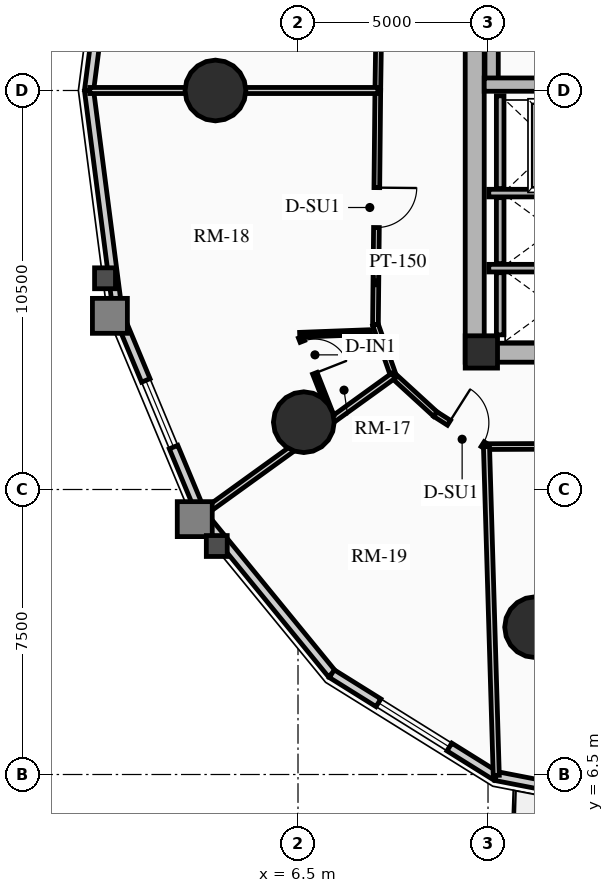
"""IFC4 building model, lengths in metres.
Left out: names, types, materials, properties, quantities, classifications, styles, units other than length and angle.
Written with IfcOpenShell. Run it as: python <this file> out.ifc"""

import sys

from ifc_helpers import new_model, si_unit, direction, frame, frame_2d, origin, origin_2d, place, context, subcontext, project, spatial, rectangle, circle, extrude, source, transform, mapped, element, fill, save


model = new_model("IFC4")
c1 = context("Model", 3, precision=1e-05, world=origin(), true_north=direction((0.0, 1.0)))
c2 = subcontext(c1, "Body", "Model", "MODEL_VIEW")
j1 = project(units=[si_unit("LENGTHUNIT", "METRE"), si_unit("PLANEANGLEUNIT", "RADIAN")], contexts=[c1])
p1 = place(None, origin())
s1 = spatial("IfcSite", under=j1, at=p1, CompositionType="ELEMENT")
p2 = place(p1, origin())
s2 = spatial("IfcBuilding", under=s1, at=p2, CompositionType="ELEMENT")
p3 = place(p2, frame((0.0, 0.0, 30.73)))
s3 = spatial("IfcBuildingStorey", under=s2, at=p3, CompositionType="ELEMENT", Elevation=30.73)
p4 = place(p3, frame((11.15, 17.35, 0.0), z_axis=(0.0, 0.0, 1.0), x_axis=(0.0, 1.0, 0.0)))
e1 = element("IfcWall", 1, at=p4, inside=s3, PredefinedType="SHEAR", context=c2, shape_type="SweptSolid", body=[
    extrude(rectangle(XDim=14.3, YDim=0.5, at=frame_2d((7.15, 0.0))), origin(), (0.0, 0.0, 1.0), 2.91),
])
p5 = place(p3, frame((11.15, 17.6, 0.0), z_axis=(0.0, 0.0, 1.0), x_axis=(1.0, 0.0, 0.0)))
e2 = element("IfcWall", 2, at=p5, inside=s3, PredefinedType="SHEAR", context=c2, shape_type="SweptSolid", body=[
    extrude(rectangle(XDim=10.7, YDim=0.5, at=frame_2d((5.35, 0.0))), origin(), (0.0, 0.0, 1.0), 2.91),
])
m1 = source(origin(), c2, "Body", "SweptSolid", [
    extrude(rectangle(XDim=1.5, YDim=2.02, at=frame_2d((0.75, 1.01))), frame((0.0, 0.26, 0.0), z_axis=(0.0, -1.0, 0.0), x_axis=(1.0, 0.0, 0.0)), (0.0, 0.0, 1.0), 0.52),
])
p6 = place(p5, frame((5.45, 0.0, 0.0)))
e3 = element("IfcOpeningElement", 3, at=p6, cuts=e2, PredefinedType="OPENING", context=c2, shape_type="MappedRepresentation", body=[
    mapped(m1, transform((0.0, 0.0, 0.0), x_axis=(1.0, 0.0, 0.0), y_axis=(0.0, 1.0, 0.0), z_axis=(0.0, 0.0, 1.0), scale=1.0)),
])
p7 = place(p3, frame((11.595, 24.655, 0.0), z_axis=(0.0, 0.0, 1.0), x_axis=(0.0, 1.0, 0.0)))
e4 = element("IfcWall", 4, at=p7, inside=s3, PredefinedType="SHEAR", context=c2, shape_type="SweptSolid", body=[
    extrude(rectangle(XDim=6.745, YDim=0.35, at=frame_2d((3.373, 0.0))), origin(), (0.0, 0.0, 1.0), 2.91),
])
p8 = place(p3, frame((11.4, 24.655, 0.0), z_axis=(0.0, 0.0, 1.0), x_axis=(1.0, 0.0, 0.0)))
e5 = element("IfcWall", 5, at=p8, inside=s3, PredefinedType="SHEAR", context=c2, shape_type="SweptSolid", body=[
    extrude(rectangle(XDim=3.285, YDim=0.35, at=frame_2d((1.643, 0.0))), origin(), (0.0, 0.0, 1.0), 2.91),
])
p9 = place(p3, frame((11.325, 17.62, 0.0), z_axis=(0.0, 0.0, 1.0), x_axis=(1.0, 0.0, 0.0)))
e6 = element("IfcColumn", 6, at=p9, inside=s3, PredefinedType="COLUMN", context=c2, shape_type="SweptSolid", body=[
    extrude(rectangle(XDim=0.85, YDim=0.85, at=origin_2d()), origin(), (0.0, 0.0, 1.0), 2.91),
])
for number, where, z_axis, x_axis in (
    (7, (4.328, 24.5, 0.0), (0.0, 0.0, 1.0), (1.0, 0.0, 0.0)),
    (8, (6.653, 15.771, 0.0), (0.0, 0.0, 1.0), (1.0, 0.0, 0.0)),
    (9, (12.739, 10.377, 0.0), (0.0, 0.0, 1.0), (1.0, 0.0, 0.0)),
):
    element("IfcColumn", number, at=place(p3, frame(where, z_axis=z_axis, x_axis=x_axis)), inside=s3, PredefinedType="USERDEFINED", context=c2, shape_type="SweptSolid", body=[
        extrude(circle(Radius=0.8, at=origin_2d()), origin(), (0.0, 0.0, 1.0), 2.91),
    ])
p10 = place(p3, frame((1.001, 24.5, 0.0), z_axis=(0.0, 0.0, 1.0), x_axis=(0.128329107357, 0.991731637191, 0.0)))
e10 = element("IfcWall", 10, at=p10, inside=s3, PredefinedType="SOLIDWALL", context=c2, shape_type="SweptSolid", body=[
    extrude(rectangle(XDim=5.911, YDim=0.24, at=frame_2d((2.956, 0.0))), origin(), (0.0, 0.0, 1.0), 2.073),
])
m2 = source(origin(), c2, "Body", "SweptSolid", [
    extrude(rectangle(XDim=1.9, YDim=1.35, at=frame_2d((0.95, 0.675))), frame((0.0, 0.13, 0.0), z_axis=(0.0, -1.0, 0.0), x_axis=(1.0, 0.0, 0.0)), (0.0, 0.0, 1.0), 0.26),
])
p11 = place(p10, frame((2.005, 0.0, 0.65)))
e11 = element("IfcOpeningElement", 11, at=p11, cuts=e10, PredefinedType="OPENING", context=c2, shape_type="MappedRepresentation", body=[
    mapped(m2, transform((0.0, 0.0, 0.0), x_axis=(1.0, 0.0, 0.0), y_axis=(0.0, 1.0, 0.0), z_axis=(0.0, 0.0, 1.0), scale=1.0)),
])
p12 = place(p3, frame((1.76, 18.638, 0.0), z_axis=(0.0, 0.0, 1.0), x_axis=(-0.128329107357, 0.991731637191, 0.0)))
e12 = element("IfcWall", 12, at=p12, inside=s3, PredefinedType="SOLIDWALL", context=c2, shape_type="SweptSolid", body=[
    extrude(rectangle(XDim=5.911, YDim=0.24, at=frame_2d((2.956, 0.0))), origin(), (0.0, 0.0, 1.0), 2.073),
])
p13 = place(p3, frame((3.961, 13.35, 0.0), z_axis=(0.0, 0.0, 1.0), x_axis=(-0.38430970593, 0.923204229804, 0.0)))
e13 = element("IfcWall", 13, at=p13, inside=s3, PredefinedType="SOLIDWALL", context=c2, shape_type="SweptSolid", body=[
    extrude(rectangle(XDim=5.728, YDim=0.24, at=frame_2d((2.864, 0.0))), origin(), (0.0, 0.0, 1.0), 2.073),
])
p14 = place(p13, frame((1.914, 0.0, 0.65)))
e14 = element("IfcOpeningElement", 14, at=p14, cuts=e13, PredefinedType="OPENING", context=c2, shape_type="MappedRepresentation", body=[
    mapped(m2, transform((0.0, 0.0, 0.0), x_axis=(1.0, 0.0, 0.0), y_axis=(0.0, 1.0, 0.0), z_axis=(0.0, 0.0, 1.0), scale=1.0)),
])
p15 = place(p3, frame((7.39, 9.153, 0.0), z_axis=(0.0, 0.0, 1.0), x_axis=(-0.632710215588, 0.774388651189, 0.0)))
e15 = element("IfcWall", 15, at=p15, inside=s3, PredefinedType="SOLIDWALL", context=c2, shape_type="SweptSolid", body=[
    extrude(rectangle(XDim=5.419, YDim=0.24, at=frame_2d((2.71, 0.0))), origin(), (0.0, 0.0, 1.0), 2.073),
])
p16 = place(p3, frame((11.71, 6.458, 0.0), z_axis=(0.0, 0.0, 1.0), x_axis=(-0.848528534887, 0.529149624853, 0.0)))
e16 = element("IfcWall", 16, at=p16, inside=s3, PredefinedType="SOLIDWALL", context=c2, shape_type="SweptSolid", body=[
    extrude(rectangle(XDim=5.092, YDim=0.24, at=frame_2d((2.546, 0.0))), origin(), (0.0, 0.0, 1.0), 2.073),
])
m3 = source(origin(), c2, "Body", "SweptSolid", [
    extrude(rectangle(XDim=2.2, YDim=1.35, at=frame_2d((1.1, 0.675))), frame((0.0, 0.13, 0.0), z_axis=(0.0, -1.0, 0.0), x_axis=(1.0, 0.0, 0.0)), (0.0, 0.0, 1.0), 0.26),
])
p17 = place(p16, frame((1.446, 0.0, 0.65)))
e17 = element("IfcOpeningElement", 17, at=p17, cuts=e16, PredefinedType="OPENING", context=c2, shape_type="MappedRepresentation", body=[
    mapped(m3, transform((0.0, 0.0, 0.0), x_axis=(1.0, 0.0, 0.0), y_axis=(0.0, 1.0, 0.0), z_axis=(0.0, 0.0, 1.0), scale=1.0)),
])
p18 = place(p3, frame((16.5, 5.53, 0.0), z_axis=(0.0, 0.0, 1.0), x_axis=(-0.981724094622, 0.190309752872, 0.0)))
e18 = element("IfcWall", 18, at=p18, inside=s3, PredefinedType="SOLIDWALL", context=c2, shape_type="SweptSolid", body=[
    extrude(rectangle(XDim=4.879, YDim=0.24, at=frame_2d((2.439, 0.0))), origin(), (0.0, 0.0, 1.0), 2.073),
])
m4 = source(origin(), c2, "Body", "SweptSolid", [
    extrude(rectangle(XDim=1.15, YDim=2.005, at=frame_2d((0.575, 1.002))), frame((0.0, 0.13, 0.0), z_axis=(0.0, -1.0, 0.0), x_axis=(1.0, 0.0, 0.0)), (0.0, 0.0, 1.0), 0.26),
])
p19 = place(p18, frame((1.864, 0.0, 0.0)))
e19 = element("IfcOpeningElement", 19, at=p19, cuts=e18, PredefinedType="OPENING", context=c2, shape_type="MappedRepresentation", body=[
    mapped(m4, transform((0.0, 0.0, 0.0), x_axis=(1.0, 0.0, 0.0), y_axis=(0.0, 1.0, 0.0), z_axis=(0.0, 0.0, 1.0), scale=1.0)),
])
p20 = place(p3, frame((11.52, 21.8, 0.0), z_axis=(0.0, 0.0, 1.0), x_axis=(1.0, 0.0, 0.0)))
e20 = element("IfcWall", 20, at=p20, inside=s3, PredefinedType="SHEAR", context=c2, shape_type="SweptSolid", body=[
    extrude(rectangle(XDim=2.97, YDim=0.2, at=frame_2d((1.485, 0.0))), origin(), (0.0, 0.0, 1.0), 2.91),
])
p21 = place(p3, frame((11.82, 21.92, 0.0), z_axis=(0.0, 0.0, 1.0), x_axis=(0.0, 1.0, 0.0)))
e21 = element("IfcWall", 21, at=p21, inside=s3, PredefinedType="SHEAR", context=c2, shape_type="SweptSolid", body=[
    extrude(rectangle(XDim=2.44, YDim=0.2, at=frame_2d((1.22, 0.0))), origin(), (0.0, 0.0, 1.0), 2.91),
])
p22 = place(p3, frame((11.52, 19.825, 0.0), z_axis=(0.0, 0.0, 1.0), x_axis=(1.0, 0.0, 0.0)))
e22 = element("IfcWall", 22, at=p22, inside=s3, PredefinedType="SHEAR", context=c2, shape_type="SweptSolid", body=[
    extrude(rectangle(XDim=2.97, YDim=0.2, at=frame_2d((1.485, 0.0))), origin(), (0.0, 0.0, 1.0), 2.91),
])
p23 = place(p3, frame((11.82, 19.945, 0.0), z_axis=(0.0, 0.0, 1.0), x_axis=(0.0, 1.0, 0.0)))
e23 = element("IfcWall", 23, at=p23, inside=s3, PredefinedType="SHEAR", context=c2, shape_type="SweptSolid", body=[
    extrude(rectangle(XDim=1.735, YDim=0.2, at=frame_2d((0.867, 0.0))), origin(), (0.0, 0.0, 1.0), 2.91),
])
p24 = place(p3, frame((11.82, 18.07, 0.0), z_axis=(0.0, 0.0, 1.0), x_axis=(0.0, 1.0, 0.0)))
e24 = element("IfcWall", 24, at=p24, inside=s3, PredefinedType="SHEAR", context=c2, shape_type="SweptSolid", body=[
    extrude(rectangle(XDim=1.635, YDim=0.2, at=frame_2d((0.817, 0.0))), origin(), (0.0, 0.0, 1.0), 2.91),
])
p25 = place(p3, frame((8.693, 30.544, 0.0), z_axis=(0.0, 0.0, 1.0), x_axis=(-0.015307007986, -0.99988284089, 0.0)))
e25 = element("IfcWall", 25, at=p25, inside=s3, PredefinedType="PARTITIONING", context=c2, shape_type="SweptSolid", body=[
    extrude(rectangle(XDim=6.045, YDim=0.15, at=frame_2d((3.022, 0.0))), origin(), (0.0, 0.0, 1.0), 2.635),
])
m5 = source(origin(), c2, "Body", "SweptSolid", [
    extrude(rectangle(XDim=1.05, YDim=2.015, at=frame_2d((0.525, 1.007))), frame((0.0, 0.085, 0.0), z_axis=(0.0, -1.0, 0.0), x_axis=(1.0, 0.0, 0.0)), (0.0, 0.0, 1.0), 0.17),
])
p26 = place(p25, frame((2.497, 0.0, 0.0)))
e26 = element("IfcOpeningElement", 26, at=p26, cuts=e25, PredefinedType="OPENING", context=c2, shape_type="MappedRepresentation", body=[
    mapped(m5, transform((0.0, 0.0, 0.0), x_axis=(1.0, 0.0, 0.0), y_axis=(0.0, 1.0, 0.0), z_axis=(0.0, 0.0, 1.0), scale=1.0)),
])
p27 = place(p3, frame((8.6, 24.5, 0.0), z_axis=(0.0, 0.0, 1.0), x_axis=(-0.010023665349, -0.999949761805, 0.0)))
e27 = element("IfcWall", 27, at=p27, inside=s3, PredefinedType="PARTITIONING", context=c2, shape_type="SweptSolid", body=[
    extrude(rectangle(XDim=6.162, YDim=0.15, at=frame_2d((3.081, 0.0))), origin(), (0.0, 0.0, 1.0), 2.159),
])
p28 = place(p27, frame((2.556, 0.0, 0.0)))
e28 = element("IfcOpeningElement", 28, at=p28, cuts=e27, PredefinedType="OPENING", context=c2, shape_type="MappedRepresentation", body=[
    mapped(m5, transform((0.0, 0.0, 0.0), x_axis=(1.0, 0.0, 0.0), y_axis=(0.0, 1.0, 0.0), z_axis=(0.0, 0.0, 1.0), scale=1.0)),
])
p29 = place(p3, frame((8.538, 18.338, 0.0), z_axis=(0.0, 0.0, 1.0), x_axis=(0.331358150167, -0.94350504838, 0.0)))
e29 = element("IfcWall", 29, at=p29, inside=s3, PredefinedType="PARTITIONING", context=c2, shape_type="SweptSolid", body=[
    extrude(rectangle(XDim=1.424, YDim=0.15, at=frame_2d((0.712, 0.0))), origin(), (0.0, 0.0, 1.0), 2.205),
])
p30 = place(p3, frame((9.01, 16.994, 0.0), z_axis=(0.0, 0.0, 1.0), x_axis=(0.737701798986, -0.67512669609, 0.0)))
e30 = element("IfcWall", 30, at=p30, inside=s3, PredefinedType="PARTITIONING", context=c2, shape_type="SweptSolid", body=[
    extrude(rectangle(XDim=1.498, YDim=0.15, at=frame_2d((0.749, 0.0))), origin(), (0.0, 0.0, 1.0), 2.159),
])
p31 = place(p3, frame((10.115, 15.983, 0.0), z_axis=(0.0, 0.0, 1.0), x_axis=(0.843995849351, -0.536349705209, 0.0)))
e31 = element("IfcWall", 31, at=p31, inside=s3, PredefinedType="PARTITIONING", context=c2, shape_type="SweptSolid", body=[
    extrude(rectangle(XDim=1.593, YDim=0.15, at=frame_2d((0.796, 0.0))), origin(), (0.0, 0.0, 1.0), 2.205),
])
p32 = place(p31, frame((0.423, 0.0, 0.0)))
e32 = element("IfcOpeningElement", 32, at=p32, cuts=e31, PredefinedType="OPENING", context=c2, shape_type="MappedRepresentation", body=[
    mapped(m5, transform((0.0, 0.0, 0.0), x_axis=(1.0, 0.0, 0.0), y_axis=(0.0, 1.0, 0.0), z_axis=(0.0, 0.0, 1.0), scale=1.0)),
])
p33 = place(p3, frame((11.46, 15.129, 0.0), z_axis=(0.0, 0.0, 1.0), x_axis=(0.999993513287, 0.003601858435, 0.0)))
e33 = element("IfcWall", 33, at=p33, inside=s3, PredefinedType="PARTITIONING", context=c2, shape_type="SweptSolid", body=[
    extrude(rectangle(XDim=3.321, YDim=0.15, at=frame_2d((1.661, 0.0))), origin(), (0.0, 0.0, 1.0), 2.159),
])
p34 = place(p33, frame((1.643, 0.0, 0.0)))
e34 = element("IfcOpeningElement", 34, at=p34, cuts=e33, PredefinedType="OPENING", context=c2, shape_type="MappedRepresentation", body=[
    mapped(m5, transform((0.0, 0.0, 0.0), x_axis=(1.0, 0.0, 0.0), y_axis=(0.0, 1.0, 0.0), z_axis=(0.0, 0.0, 1.0), scale=1.0)),
])
p35 = place(p3, frame((8.6, 24.5, 0.0), z_axis=(0.0, 0.0, 1.0), x_axis=(-1.0, 0.0, 0.0)))
e35 = element("IfcWall", 35, at=p35, inside=s3, PredefinedType="PARTITIONING", context=c2, shape_type="SweptSolid", body=[
    extrude(rectangle(XDim=7.579, YDim=0.16, at=frame_2d((3.79, 0.0))), origin(), (0.0, 0.0, 1.0), 2.073),
])
p36 = place(p3, frame((9.01, 16.994, 0.0), z_axis=(0.0, 0.0, 1.0), x_axis=(-0.810839958558, -0.585267940012, 0.0)))
e36 = element("IfcWall", 36, at=p36, inside=s3, PredefinedType="PARTITIONING", context=c2, shape_type="SweptSolid", body=[
    extrude(rectangle(XDim=6.207, YDim=0.16, at=frame_2d((3.104, 0.0))), origin(), (0.0, 0.0, 1.0), 2.073),
])
p37 = place(p3, frame((11.46, 15.129, 0.0), z_axis=(0.0, 0.0, 1.0), x_axis=(0.029703270067, -0.999558760528, 0.0)))
e37 = element("IfcWall", 37, at=p37, inside=s3, PredefinedType="PARTITIONING", context=c2, shape_type="SweptSolid", body=[
    extrude(rectangle(XDim=8.655, YDim=0.16, at=frame_2d((4.328, 0.0))), origin(), (0.0, 0.0, 1.0), 2.073),
])
p38 = place(p3, frame((8.409, 18.143, 0.0), z_axis=(0.0, 0.0, 1.0), x_axis=(-0.999294242072, -0.037563516369, 0.0)))
e38 = element("IfcWall", 38, at=p38, inside=s3, PredefinedType="PARTITIONING", context=c2, shape_type="SweptSolid", body=[
    extrude(rectangle(XDim=1.865, YDim=0.125, at=frame_2d((0.933, 0.0))), origin(), (0.0, 0.0, 1.0), 2.205),
])
p39 = place(p3, frame((6.57, 18.008, 0.0), z_axis=(0.0, 0.0, 1.0), x_axis=(0.365917141159, -0.930647433675, 0.0)))
e39 = element("IfcWall", 39, at=p39, inside=s3, PredefinedType="PARTITIONING", context=c2, shape_type="SweptSolid", body=[
    extrude(rectangle(XDim=2.225, YDim=0.125, at=frame_2d((1.113, 0.0))), origin(), (0.0, 0.0, 1.0), 2.159),
])
m6 = source(origin(), c2, "Body", "SweptSolid", [
    extrude(rectangle(XDim=0.9, YDim=2.005, at=frame_2d((0.45, 1.002))), frame((0.0, 0.073, 0.0), z_axis=(0.0, -1.0, 0.0), x_axis=(1.0, 0.0, 0.0)), (0.0, 0.0, 1.0), 0.145),
])
p40 = place(p39, frame((0.12, 0.0, 0.0)))
e40 = element("IfcOpeningElement", 40, at=p40, cuts=e39, PredefinedType="OPENING", context=c2, shape_type="MappedRepresentation", body=[
    mapped(m6, transform((0.0, 0.0, 0.0), x_axis=(1.0, 0.0, 0.0), y_axis=(0.0, 1.0, 0.0), z_axis=(0.0, 0.0, 1.0), scale=1.0)),
])
m7 = source(origin(), c2, "Body", "SweptSolid", [
    extrude(rectangle(XDim=1.9, YDim=1.35, at=frame_2d((0.95, 0.675))), frame((0.0, 0.03, 0.0), z_axis=(0.0, -1.0, 0.0), x_axis=(1.0, 0.0, 0.0)), (0.0, 0.0, 1.0), 0.06),
])
p41 = place(p14, origin())
e41 = element("IfcWindow", 41, at=p41, inside=s3, PartitioningType="DOUBLE_PANEL_VERTICAL", PredefinedType="WINDOW", context=c2, shape_type="MappedRepresentation", body=[
    mapped(m7, transform((0.0, 0.0, 0.0), x_axis=(1.0, 0.0, 0.0), y_axis=(0.0, 1.0, 0.0), z_axis=(0.0, 0.0, 1.0), scale=1.0)),
])
fill(e14, e41)
m8 = source(origin(), c2, "Body", "SweptSolid", [
    extrude(rectangle(XDim=2.2, YDim=1.35, at=frame_2d((1.1, 0.675))), frame((0.0, 0.03, 0.0), z_axis=(0.0, -1.0, 0.0), x_axis=(1.0, 0.0, 0.0)), (0.0, 0.0, 1.0), 0.06),
])
p42 = place(p17, origin())
e42 = element("IfcWindow", 42, at=p42, inside=s3, PartitioningType="DOUBLE_PANEL_VERTICAL", PredefinedType="WINDOW", context=c2, shape_type="MappedRepresentation", body=[
    mapped(m8, transform((0.0, 0.0, 0.0), x_axis=(1.0, 0.0, 0.0), y_axis=(0.0, 1.0, 0.0), z_axis=(0.0, 0.0, 1.0), scale=1.0)),
])
fill(e17, e42)
m9 = source(origin(), c2, "Body", "SweptSolid", [
    extrude(rectangle(XDim=1.05, YDim=2.015, at=frame_2d((0.525, 1.007))), frame((0.0, 0.025, 0.0), z_axis=(0.0, -1.0, 0.0), x_axis=(1.0, 0.0, 0.0)), (0.0, 0.0, 1.0), 0.05),
])
p43 = place(p28, origin())
e43 = element("IfcDoor", 43, at=p43, inside=s3, OperationType="SINGLE_SWING_LEFT", PredefinedType="DOOR", context=c2, shape_type="MappedRepresentation", body=[
    mapped(m9, transform((0.0, 0.0, 0.0), x_axis=(1.0, 0.0, 0.0), y_axis=(0.0, 1.0, 0.0), z_axis=(0.0, 0.0, 1.0), scale=1.0)),
])
fill(e28, e43)
m10 = source(origin(), c2, "Body", "SweptSolid", [
    extrude(rectangle(XDim=0.9, YDim=2.005, at=frame_2d((0.45, 1.002))), frame((0.0, 0.025, 0.0), z_axis=(0.0, -1.0, 0.0), x_axis=(1.0, 0.0, 0.0)), (0.0, 0.0, 1.0), 0.05),
])
p44 = place(p40, origin())
e44 = element("IfcDoor", 44, at=p44, inside=s3, OperationType="SINGLE_SWING_RIGHT", PredefinedType="DOOR", context=c2, shape_type="MappedRepresentation", body=[
    mapped(m10, transform((0.0, 0.0, 0.0), x_axis=(1.0, 0.0, 0.0), y_axis=(0.0, 1.0, 0.0), z_axis=(0.0, 0.0, 1.0), scale=1.0)),
])
fill(e40, e44)
p45 = place(p32, origin())
e45 = element("IfcDoor", 45, at=p45, inside=s3, OperationType="SINGLE_SWING_LEFT", PredefinedType="DOOR", context=c2, shape_type="MappedRepresentation", body=[
    mapped(m9, transform((0.0, 0.0, 0.0), x_axis=(1.0, 0.0, 0.0), y_axis=(0.0, 1.0, 0.0), z_axis=(0.0, 0.0, 1.0), scale=1.0)),
])
fill(e32, e45)
save(model, sys.argv[1])
